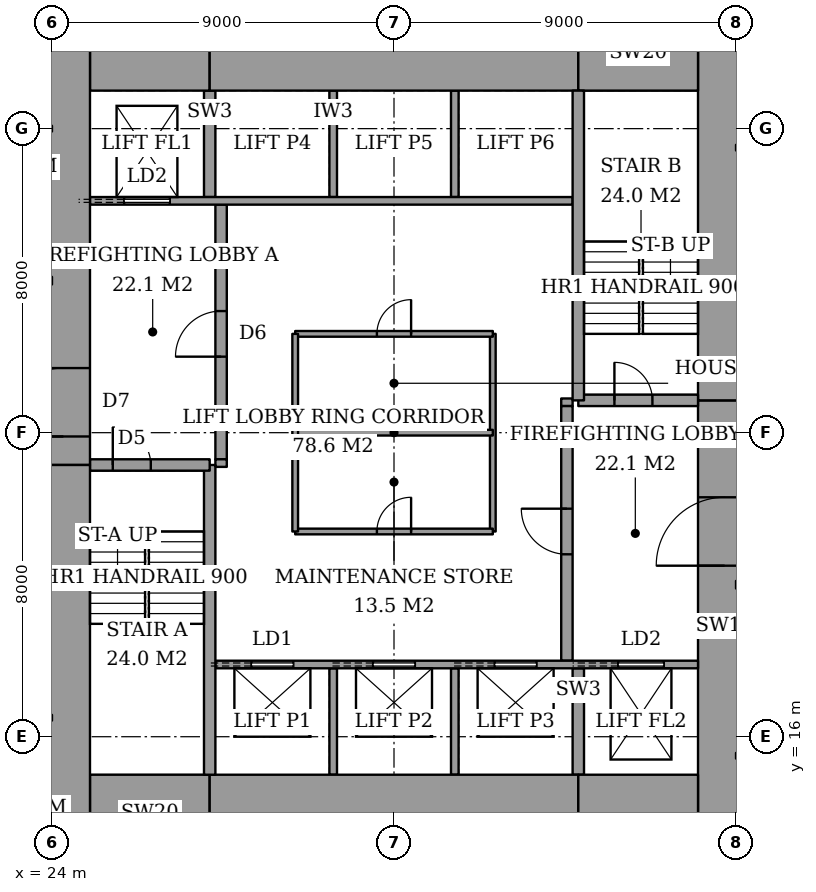
"""IFC4 building model, lengths in metres.
Left out: names, types, materials, properties, quantities, classifications, styles, units other than length and angle.
Written with IfcOpenShell. Run it as: python <this file> out.ifc"""

import sys

from ifc_helpers import new_model, si_unit, direction, frame, frame_2d, origin, place, context, subcontext, project, spatial, rectangle, extrude, element, fill, save


model = new_model("IFC4")
c1 = context("Model", 3, precision=1e-05, world=origin(), true_north=direction((0.0, 1.0)))
c2 = subcontext(c1, "Body", "Model", "MODEL_VIEW")
j1 = project(units=[si_unit("LENGTHUNIT", "METRE"), si_unit("PLANEANGLEUNIT", "RADIAN")], contexts=[c1])
p1 = place(None, origin())
s1 = spatial("IfcSite", under=j1, at=p1, CompositionType="ELEMENT")
p2 = place(p1, origin())
s2 = spatial("IfcBuilding", under=s1, at=p2, CompositionType="ELEMENT")
p3 = place(p2, frame((0.0, 0.0, 99.8)))
s3 = spatial("IfcBuildingStorey", under=s2, at=p3, CompositionType="ELEMENT", Elevation=99.8)
p4 = place(p3, frame((25.0, 14.0, 0.0), z_axis=(0.0, 0.0, 1.0), x_axis=(1.0, 0.0, 0.0)))
e1 = element("IfcWall", 1, at=p4, inside=s3, PredefinedType="SHEAR", context=c2, shape_type="SweptSolid", body=[
    extrude(rectangle(XDim=3.15, YDim=2.0, at=frame_2d((1.575, 0.0))), origin(), (0.0, 0.0, 1.0), 3.6),
])
p5 = place(p3, frame((28.15, 14.0, 0.0), z_axis=(0.0, 0.0, 1.0), x_axis=(1.0, 0.0, 0.0)))
e2 = element("IfcWall", 2, at=p5, inside=s3, PredefinedType="SHEAR", context=c2, shape_type="SweptSolid", body=[
    extrude(rectangle(XDim=9.7, YDim=2.0, at=frame_2d((4.85, 0.0))), origin(), (0.0, 0.0, 1.0), 3.6),
])
for number, where, z_axis, x_axis in (
    (3, (37.85, 14.0, 0.0), (0.0, 0.0, 1.0), (1.0, 0.0, 0.0)),
    (4, (25.0, 34.0, 0.0), (0.0, 0.0, 1.0), (1.0, 0.0, 0.0)),
):
    element("IfcWall", number, at=place(p3, frame(where, z_axis=z_axis, x_axis=x_axis)), inside=s3, PredefinedType="SHEAR", context=c2, shape_type="SweptSolid", body=[
        extrude(rectangle(XDim=3.15, YDim=2.0, at=frame_2d((1.575, 0.0))), origin(), (0.0, 0.0, 1.0), 3.6),
    ])
p6 = place(p3, frame((28.15, 34.0, 0.0), z_axis=(0.0, 0.0, 1.0), x_axis=(1.0, 0.0, 0.0)))
e5 = element("IfcWall", 5, at=p6, inside=s3, PredefinedType="SHEAR", context=c2, shape_type="SweptSolid", body=[
    extrude(rectangle(XDim=9.7, YDim=2.0, at=frame_2d((4.85, 0.0))), origin(), (0.0, 0.0, 1.0), 3.6),
])
p7 = place(p3, frame((37.85, 34.0, 0.0), z_axis=(0.0, 0.0, 1.0), x_axis=(1.0, 0.0, 0.0)))
e6 = element("IfcWall", 6, at=p7, inside=s3, PredefinedType="SHEAR", context=c2, shape_type="SweptSolid", body=[
    extrude(rectangle(XDim=3.15, YDim=2.0, at=frame_2d((1.575, 0.0))), origin(), (0.0, 0.0, 1.0), 3.6),
])
p8 = place(p3, frame((24.3, 13.0, 0.0), z_axis=(0.0, 0.0, 1.0), x_axis=(0.0, 1.0, 0.0)))
e7 = element("IfcWall", 7, at=p8, inside=s3, PredefinedType="SHEAR", context=c2, shape_type="SweptSolid", body=[
    extrude(rectangle(XDim=10.15, YDim=1.4, at=frame_2d((5.075, 0.0))), origin(), (0.0, 0.0, 1.0), 3.6),
])
p9 = place(p3, frame((24.3, 23.15, 0.0), z_axis=(0.0, 0.0, 1.0), x_axis=(0.0, 1.0, 0.0)))
e8 = element("IfcWall", 8, at=p9, inside=s3, PredefinedType="SHEAR", context=c2, shape_type="SweptSolid", body=[
    extrude(rectangle(XDim=11.85, YDim=1.4, at=frame_2d((5.925, 0.0))), origin(), (0.0, 0.0, 1.0), 3.6),
])
p10 = place(p9, frame((0.75, 0.0, 0.0)))
e9 = element("IfcOpeningElement", 9, at=p10, cuts=e8, PredefinedType="OPENING", context=c2, shape_type="SweptSolid", body=[
    extrude(rectangle(XDim=1.8, YDim=2.4, at=frame_2d((0.9, 1.2))), frame((0.0, 0.71, 0.0), z_axis=(0.0, -1.0, 0.0), x_axis=(1.0, 0.0, 0.0)), (0.0, 0.0, 1.0), 1.42),
])
p11 = place(p3, frame((41.7, 13.0, 0.0), z_axis=(0.0, 0.0, 1.0), x_axis=(0.0, 1.0, 0.0)))
e10 = element("IfcWall", 10, at=p11, inside=s3, PredefinedType="SHEAR", context=c2, shape_type="SweptSolid", body=[
    extrude(rectangle(XDim=11.85, YDim=1.4, at=frame_2d((5.925, 0.0))), origin(), (0.0, 0.0, 1.0), 3.6),
])
p12 = place(p11, frame((7.5, 0.0, 0.0)))
e11 = element("IfcOpeningElement", 11, at=p12, cuts=e10, PredefinedType="OPENING", context=c2, shape_type="SweptSolid", body=[
    extrude(rectangle(XDim=1.8, YDim=2.4, at=frame_2d((0.9, 1.2))), frame((0.0, 0.71, 0.0), z_axis=(0.0, -1.0, 0.0), x_axis=(1.0, 0.0, 0.0)), (0.0, 0.0, 1.0), 1.42),
])
p13 = place(p3, frame((41.7, 24.85, 0.0), z_axis=(0.0, 0.0, 1.0), x_axis=(0.0, 1.0, 0.0)))
e12 = element("IfcWall", 12, at=p13, inside=s3, PredefinedType="SHEAR", context=c2, shape_type="SweptSolid", body=[
    extrude(rectangle(XDim=10.15, YDim=1.4, at=frame_2d((5.075, 0.0))), origin(), (0.0, 0.0, 1.0), 3.6),
])
p14 = place(p3, frame((28.15, 15.0, 0.0), z_axis=(0.0, 0.0, 1.0), x_axis=(0.0, 1.0, 0.0)))
e13 = element("IfcWall", 13, at=p14, inside=s3, PredefinedType="SHEAR", context=c2, shape_type="SweptSolid", body=[
    extrude(rectangle(XDim=8.15, YDim=0.3, at=frame_2d((4.075, 0.0))), origin(), (0.0, 0.0, 1.0), 3.6),
])
p15 = place(p3, frame((25.0, 23.15, 0.0), z_axis=(0.0, 0.0, 1.0), x_axis=(1.0, 0.0, 0.0)))
e14 = element("IfcWall", 14, at=p15, inside=s3, PredefinedType="SHEAR", context=c2, shape_type="SweptSolid", body=[
    extrude(rectangle(XDim=3.15, YDim=0.3, at=frame_2d((1.575, 0.0))), origin(), (0.0, 0.0, 1.0), 3.6),
])
p16 = place(p15, frame((0.6, 0.0, 0.0)))
e15 = element("IfcOpeningElement", 15, at=p16, cuts=e14, PredefinedType="OPENING", context=c2, shape_type="SweptSolid", body=[
    extrude(rectangle(XDim=1.0, YDim=2.1, at=frame_2d((0.5, 1.05))), frame((0.0, 0.16, 0.0), z_axis=(0.0, -1.0, 0.0), x_axis=(1.0, 0.0, 0.0)), (0.0, 0.0, 1.0), 0.32),
])
p17 = place(p3, frame((37.85, 24.85, 0.0), z_axis=(0.0, 0.0, 1.0), x_axis=(0.0, 1.0, 0.0)))
e16 = element("IfcWall", 16, at=p17, inside=s3, PredefinedType="SHEAR", context=c2, shape_type="SweptSolid", body=[
    extrude(rectangle(XDim=8.15, YDim=0.3, at=frame_2d((4.075, 0.0))), origin(), (0.0, 0.0, 1.0), 3.6),
])
p18 = place(p3, frame((37.85, 24.85, 0.0), z_axis=(0.0, 0.0, 1.0), x_axis=(1.0, 0.0, 0.0)))
e17 = element("IfcWall", 17, at=p18, inside=s3, PredefinedType="SHEAR", context=c2, shape_type="SweptSolid", body=[
    extrude(rectangle(XDim=3.15, YDim=0.3, at=frame_2d((1.575, 0.0))), origin(), (0.0, 0.0, 1.0), 3.6),
])
p19 = place(p18, frame((0.95, 0.0, 0.0)))
e18 = element("IfcOpeningElement", 18, at=p19, cuts=e17, PredefinedType="OPENING", context=c2, shape_type="SweptSolid", body=[
    extrude(rectangle(XDim=1.0, YDim=2.1, at=frame_2d((0.5, 1.05))), frame((0.0, 0.16, 0.0), z_axis=(0.0, -1.0, 0.0), x_axis=(1.0, 0.0, 0.0)), (0.0, 0.0, 1.0), 0.32),
])
p20 = place(p3, frame((28.45, 23.3, 0.0), z_axis=(0.0, 0.0, 1.0), x_axis=(0.0, 1.0, 0.0)))
e19 = element("IfcWall", 19, at=p20, inside=s3, PredefinedType="PARTITIONING", context=c2, shape_type="SweptSolid", body=[
    extrude(rectangle(XDim=6.7, YDim=0.3, at=frame_2d((3.35, 0.0))), origin(), (0.0, 0.0, 1.0), 3.6),
])
p21 = place(p20, frame((2.7, 0.0, 0.0)))
e20 = element("IfcOpeningElement", 20, at=p21, cuts=e19, PredefinedType="OPENING", context=c2, shape_type="SweptSolid", body=[
    extrude(rectangle(XDim=1.2, YDim=2.1, at=frame_2d((0.6, 1.05))), frame((0.0, 0.16, 0.0), z_axis=(0.0, -1.0, 0.0), x_axis=(1.0, 0.0, 0.0)), (0.0, 0.0, 1.0), 0.32),
])
p22 = place(p3, frame((37.55, 18.0, 0.0), z_axis=(0.0, 0.0, 1.0), x_axis=(0.0, 1.0, 0.0)))
e21 = element("IfcWall", 21, at=p22, inside=s3, PredefinedType="PARTITIONING", context=c2, shape_type="SweptSolid", body=[
    extrude(rectangle(XDim=6.7, YDim=0.3, at=frame_2d((3.35, 0.0))), origin(), (0.0, 0.0, 1.0), 3.6),
])
p23 = place(p22, frame((2.8, 0.0, 0.0)))
e22 = element("IfcOpeningElement", 22, at=p23, cuts=e21, PredefinedType="OPENING", context=c2, shape_type="SweptSolid", body=[
    extrude(rectangle(XDim=1.2, YDim=2.1, at=frame_2d((0.6, 1.05))), frame((0.0, 0.16, 0.0), z_axis=(0.0, -1.0, 0.0), x_axis=(1.0, 0.0, 0.0)), (0.0, 0.0, 1.0), 0.32),
])
p24 = place(p3, frame((28.3, 17.9, 0.0), z_axis=(0.0, 0.0, 1.0), x_axis=(1.0, 0.0, 0.0)))
e23 = element("IfcWall", 23, at=p24, inside=s3, PredefinedType="PARTITIONING", context=c2, shape_type="SweptSolid", body=[
    extrude(rectangle(XDim=12.7, YDim=0.2, at=frame_2d((6.35, 0.0))), origin(), (0.0, 0.0, 1.0), 3.6),
])
p25 = place(p24, frame((0.95, 0.0, 0.0)))
e24 = element("IfcOpeningElement", 24, at=p25, cuts=e23, PredefinedType="OPENING", context=c2, shape_type="SweptSolid", body=[
    extrude(rectangle(XDim=1.1, YDim=2.1, at=frame_2d((0.55, 1.05))), frame((0.0, 0.11, 0.0), z_axis=(0.0, -1.0, 0.0), x_axis=(1.0, 0.0, 0.0)), (0.0, 0.0, 1.0), 0.22),
])
p26 = place(p24, frame((4.15, 0.0, 0.0)))
e25 = element("IfcOpeningElement", 25, at=p26, cuts=e23, PredefinedType="OPENING", context=c2, shape_type="SweptSolid", body=[
    extrude(rectangle(XDim=1.1, YDim=2.1, at=frame_2d((0.55, 1.05))), frame((0.0, 0.11, 0.0), z_axis=(0.0, -1.0, 0.0), x_axis=(1.0, 0.0, 0.0)), (0.0, 0.0, 1.0), 0.22),
])
p27 = place(p24, frame((7.35, 0.0, 0.0)))
e26 = element("IfcOpeningElement", 26, at=p27, cuts=e23, PredefinedType="OPENING", context=c2, shape_type="SweptSolid", body=[
    extrude(rectangle(XDim=1.1, YDim=2.1, at=frame_2d((0.55, 1.05))), frame((0.0, 0.11, 0.0), z_axis=(0.0, -1.0, 0.0), x_axis=(1.0, 0.0, 0.0)), (0.0, 0.0, 1.0), 0.22),
])
p28 = place(p24, frame((10.6, 0.0, 0.0)))
e27 = element("IfcOpeningElement", 27, at=p28, cuts=e23, PredefinedType="OPENING", context=c2, shape_type="SweptSolid", body=[
    extrude(rectangle(XDim=1.2, YDim=2.1, at=frame_2d((0.6, 1.05))), frame((0.0, 0.11, 0.0), z_axis=(0.0, -1.0, 0.0), x_axis=(1.0, 0.0, 0.0)), (0.0, 0.0, 1.0), 0.22),
])
p29 = place(p3, frame((25.0, 30.1, 0.0), z_axis=(0.0, 0.0, 1.0), x_axis=(1.0, 0.0, 0.0)))
e28 = element("IfcWall", 28, at=p29, inside=s3, PredefinedType="PARTITIONING", context=c2, shape_type="SweptSolid", body=[
    extrude(rectangle(XDim=12.7, YDim=0.2, at=frame_2d((6.35, 0.0))), origin(), (0.0, 0.0, 1.0), 3.6),
])
p30 = place(p29, frame((0.9, 0.0, 0.0)))
e29 = element("IfcOpeningElement", 29, at=p30, cuts=e28, PredefinedType="OPENING", context=c2, shape_type="SweptSolid", body=[
    extrude(rectangle(XDim=1.2, YDim=2.1, at=frame_2d((0.6, 1.05))), frame((0.0, 0.11, 0.0), z_axis=(0.0, -1.0, 0.0), x_axis=(1.0, 0.0, 0.0)), (0.0, 0.0, 1.0), 0.22),
])
for number, where, z_axis, x_axis in (
    (30, (31.4, 15.0, 0.0), (0.0, 0.0, 1.0), (0.0, 1.0, 0.0)),
    (31, (34.6, 15.0, 0.0), (0.0, 0.0, 1.0), (0.0, 1.0, 0.0)),
):
    element("IfcWall", number, at=place(p3, frame(where, z_axis=z_axis, x_axis=x_axis)), inside=s3, PredefinedType="PARTITIONING", context=c2, shape_type="SweptSolid", body=[
        extrude(rectangle(XDim=2.8, YDim=0.2, at=frame_2d((1.4, 0.0))), origin(), (0.0, 0.0, 1.0), 3.6),
    ])
p31 = place(p3, frame((37.85, 15.0, 0.0), z_axis=(0.0, 0.0, 1.0), x_axis=(0.0, 1.0, 0.0)))
e32 = element("IfcWall", 32, at=p31, inside=s3, PredefinedType="SHEAR", context=c2, shape_type="SweptSolid", body=[
    extrude(rectangle(XDim=2.8, YDim=0.3, at=frame_2d((1.4, 0.0))), origin(), (0.0, 0.0, 1.0), 3.6),
])
for number, where, z_axis, x_axis in (
    (33, (31.4, 30.2, 0.0), (0.0, 0.0, 1.0), (0.0, 1.0, 0.0)),
    (34, (34.6, 30.2, 0.0), (0.0, 0.0, 1.0), (0.0, 1.0, 0.0)),
):
    element("IfcWall", number, at=place(p3, frame(where, z_axis=z_axis, x_axis=x_axis)), inside=s3, PredefinedType="PARTITIONING", context=c2, shape_type="SweptSolid", body=[
        extrude(rectangle(XDim=2.8, YDim=0.2, at=frame_2d((1.4, 0.0))), origin(), (0.0, 0.0, 1.0), 3.6),
    ])
p32 = place(p3, frame((28.15, 30.2, 0.0), z_axis=(0.0, 0.0, 1.0), x_axis=(0.0, 1.0, 0.0)))
e35 = element("IfcWall", 35, at=p32, inside=s3, PredefinedType="SHEAR", context=c2, shape_type="SweptSolid", body=[
    extrude(rectangle(XDim=2.8, YDim=0.3, at=frame_2d((1.4, 0.0))), origin(), (0.0, 0.0, 1.0), 3.6),
])
for number, where, z_axis, x_axis in (
    (36, (28.3, 23.2, 0.0), (0.0, 0.0, 1.0), (1.0, 0.0, 0.0)),
    (37, (37.4, 24.8, 0.0), (0.0, 0.0, 1.0), (1.0, 0.0, 0.0)),
):
    element("IfcWall", number, at=place(p3, frame(where, z_axis=z_axis, x_axis=x_axis)), inside=s3, PredefinedType="PARTITIONING", context=c2, shape_type="SweptSolid", body=[
        extrude(rectangle(XDim=0.3, YDim=0.2, at=frame_2d((0.15, 0.0))), origin(), (0.0, 0.0, 1.0), 3.6),
    ])
p33 = place(p3, frame((30.4, 21.4, 0.0), z_axis=(0.0, 0.0, 1.0), x_axis=(1.0, 0.0, 0.0)))
e38 = element("IfcWall", 38, at=p33, inside=s3, PredefinedType="PARTITIONING", context=c2, shape_type="SweptSolid", body=[
    extrude(rectangle(XDim=5.2, YDim=0.15, at=frame_2d((2.6, 0.0))), origin(), (0.0, 0.0, 1.0), 3.35),
])
p34 = place(p33, frame((2.15, 0.0, 0.0)))
e39 = element("IfcOpeningElement", 39, at=p34, cuts=e38, PredefinedType="OPENING", context=c2, shape_type="SweptSolid", body=[
    extrude(rectangle(XDim=0.9, YDim=2.1, at=frame_2d((0.45, 1.05))), frame((0.0, 0.085, 0.0), z_axis=(0.0, -1.0, 0.0), x_axis=(1.0, 0.0, 0.0)), (0.0, 0.0, 1.0), 0.17),
])
p35 = place(p3, frame((30.4, 26.6, 0.0), z_axis=(0.0, 0.0, 1.0), x_axis=(1.0, 0.0, 0.0)))
e40 = element("IfcWall", 40, at=p35, inside=s3, PredefinedType="PARTITIONING", context=c2, shape_type="SweptSolid", body=[
    extrude(rectangle(XDim=5.2, YDim=0.15, at=frame_2d((2.6, 0.0))), origin(), (0.0, 0.0, 1.0), 3.35),
])
p36 = place(p35, frame((2.15, 0.0, 0.0)))
e41 = element("IfcOpeningElement", 41, at=p36, cuts=e40, PredefinedType="OPENING", context=c2, shape_type="SweptSolid", body=[
    extrude(rectangle(XDim=0.9, YDim=2.1, at=frame_2d((0.45, 1.05))), frame((0.0, 0.085, 0.0), z_axis=(0.0, -1.0, 0.0), x_axis=(1.0, 0.0, 0.0)), (0.0, 0.0, 1.0), 0.17),
])
for number, where, z_axis, x_axis in (
    (42, (30.4, 21.4, 0.0), (0.0, 0.0, 1.0), (0.0, 1.0, 0.0)),
    (43, (35.6, 21.4, 0.0), (0.0, 0.0, 1.0), (0.0, 1.0, 0.0)),
    (44, (30.4, 24.0, 0.0), (0.0, 0.0, 1.0), (1.0, 0.0, 0.0)),
):
    element("IfcWall", number, at=place(p3, frame(where, z_axis=z_axis, x_axis=x_axis)), inside=s3, PredefinedType="PARTITIONING", context=c2, shape_type="SweptSolid", body=[
        extrude(rectangle(XDim=5.2, YDim=0.15, at=frame_2d((2.6, 0.0))), origin(), (0.0, 0.0, 1.0), 3.35),
    ])
p37 = place(p16, origin())
e45 = element("IfcDoor", 45, at=p37, inside=s3, OperationType="SINGLE_SWING_RIGHT", PredefinedType="DOOR", context=c2, shape_type="SweptSolid", body=[
    extrude(rectangle(XDim=1.0, YDim=2.1, at=frame_2d((0.5, 1.05))), frame((0.0, 0.025, 0.0), z_axis=(0.0, -1.0, 0.0), x_axis=(1.0, 0.0, 0.0)), (0.0, 0.0, 1.0), 0.05),
])
fill(e15, e45)
p38 = place(p19, origin())
e46 = element("IfcDoor", 46, at=p38, inside=s3, OperationType="SINGLE_SWING_RIGHT", PredefinedType="DOOR", context=c2, shape_type="SweptSolid", body=[
    extrude(rectangle(XDim=1.0, YDim=2.1, at=frame_2d((0.5, 1.05))), frame((0.0, 0.025, 0.0), z_axis=(0.0, -1.0, 0.0), x_axis=(1.0, 0.0, 0.0)), (0.0, 0.0, 1.0), 0.05),
])
fill(e18, e46)
p39 = place(p21, origin())
e47 = element("IfcDoor", 47, at=p39, inside=s3, OperationType="SINGLE_SWING_RIGHT", PredefinedType="DOOR", context=c2, shape_type="SweptSolid", body=[
    extrude(rectangle(XDim=1.2, YDim=2.1, at=frame_2d((0.6, 1.05))), frame((0.0, 0.025, 0.0), z_axis=(0.0, -1.0, 0.0), x_axis=(1.0, 0.0, 0.0)), (0.0, 0.0, 1.0), 0.05),
])
fill(e20, e47)
p40 = place(p23, origin())
e48 = element("IfcDoor", 48, at=p40, inside=s3, OperationType="SINGLE_SWING_LEFT", PredefinedType="DOOR", context=c2, shape_type="SweptSolid", body=[
    extrude(rectangle(XDim=1.2, YDim=2.1, at=frame_2d((0.6, 1.05))), frame((0.0, 0.025, 0.0), z_axis=(0.0, -1.0, 0.0), x_axis=(1.0, 0.0, 0.0)), (0.0, 0.0, 1.0), 0.05),
])
fill(e22, e48)
p41 = place(p10, origin())
e49 = element("IfcDoor", 49, at=p41, inside=s3, OperationType="DOUBLE_DOOR_DOUBLE_SWING", PredefinedType="DOOR", context=c2, shape_type="SweptSolid", body=[
    extrude(rectangle(XDim=1.8, YDim=2.4, at=frame_2d((0.9, 1.2))), frame((0.0, 0.025, 0.0), z_axis=(0.0, -1.0, 0.0), x_axis=(1.0, 0.0, 0.0)), (0.0, 0.0, 1.0), 0.05),
])
fill(e9, e49)
p42 = place(p12, origin())
e50 = element("IfcDoor", 50, at=p42, inside=s3, OperationType="DOUBLE_DOOR_DOUBLE_SWING", PredefinedType="DOOR", context=c2, shape_type="SweptSolid", body=[
    extrude(rectangle(XDim=1.8, YDim=2.4, at=frame_2d((0.9, 1.2))), frame((0.0, 0.025, 0.0), z_axis=(0.0, -1.0, 0.0), x_axis=(1.0, 0.0, 0.0)), (0.0, 0.0, 1.0), 0.05),
])
fill(e11, e50)
p43 = place(p34, origin())
e51 = element("IfcDoor", 51, at=p43, inside=s3, OperationType="SINGLE_SWING_LEFT", PredefinedType="DOOR", context=c2, shape_type="SweptSolid", body=[
    extrude(rectangle(XDim=0.9, YDim=2.1, at=frame_2d((0.45, 1.05))), frame((0.0, 0.025, 0.0), z_axis=(0.0, -1.0, 0.0), x_axis=(1.0, 0.0, 0.0)), (0.0, 0.0, 1.0), 0.05),
])
fill(e39, e51)
p44 = place(p36, origin())
e52 = element("IfcDoor", 52, at=p44, inside=s3, OperationType="SINGLE_SWING_LEFT", PredefinedType="DOOR", context=c2, shape_type="SweptSolid", body=[
    extrude(rectangle(XDim=0.9, YDim=2.1, at=frame_2d((0.45, 1.05))), frame((0.0, 0.025, 0.0), z_axis=(0.0, -1.0, 0.0), x_axis=(1.0, 0.0, 0.0)), (0.0, 0.0, 1.0), 0.05),
])
fill(e41, e52)
p45 = place(p25, origin())
e53 = element("IfcDoor", 53, at=p45, inside=s3, OperationType="SLIDING_TO_LEFT", PredefinedType="DOOR", context=c2, shape_type="SweptSolid", body=[
    extrude(rectangle(XDim=1.1, YDim=2.1, at=frame_2d((0.55, 1.05))), frame((0.0, 0.025, 0.0), z_axis=(0.0, -1.0, 0.0), x_axis=(1.0, 0.0, 0.0)), (0.0, 0.0, 1.0), 0.05),
])
fill(e24, e53)
p46 = place(p26, origin())
e54 = element("IfcDoor", 54, at=p46, inside=s3, OperationType="SLIDING_TO_LEFT", PredefinedType="DOOR", context=c2, shape_type="SweptSolid", body=[
    extrude(rectangle(XDim=1.1, YDim=2.1, at=frame_2d((0.55, 1.05))), frame((0.0, 0.025, 0.0), z_axis=(0.0, -1.0, 0.0), x_axis=(1.0, 0.0, 0.0)), (0.0, 0.0, 1.0), 0.05),
])
fill(e25, e54)
p47 = place(p27, origin())
e55 = element("IfcDoor", 55, at=p47, inside=s3, OperationType="SLIDING_TO_LEFT", PredefinedType="DOOR", context=c2, shape_type="SweptSolid", body=[
    extrude(rectangle(XDim=1.1, YDim=2.1, at=frame_2d((0.55, 1.05))), frame((0.0, 0.025, 0.0), z_axis=(0.0, -1.0, 0.0), x_axis=(1.0, 0.0, 0.0)), (0.0, 0.0, 1.0), 0.05),
])
fill(e26, e55)
p48 = place(p30, origin())
e56 = element("IfcDoor", 56, at=p48, inside=s3, OperationType="SLIDING_TO_LEFT", PredefinedType="DOOR", context=c2, shape_type="SweptSolid", body=[
    extrude(rectangle(XDim=1.2, YDim=2.1, at=frame_2d((0.6, 1.05))), frame((0.0, 0.025, 0.0), z_axis=(0.0, -1.0, 0.0), x_axis=(1.0, 0.0, 0.0)), (0.0, 0.0, 1.0), 0.05),
])
fill(e29, e56)
p49 = place(p28, origin())
e57 = element("IfcDoor", 57, at=p49, inside=s3, OperationType="SLIDING_TO_LEFT", PredefinedType="DOOR", context=c2, shape_type="SweptSolid", body=[
    extrude(rectangle(XDim=1.2, YDim=2.1, at=frame_2d((0.6, 1.05))), frame((0.0, 0.025, 0.0), z_axis=(0.0, -1.0, 0.0), x_axis=(1.0, 0.0, 0.0)), (0.0, 0.0, 1.0), 0.05),
])
fill(e27, e57)
save(model, sys.argv[1])
